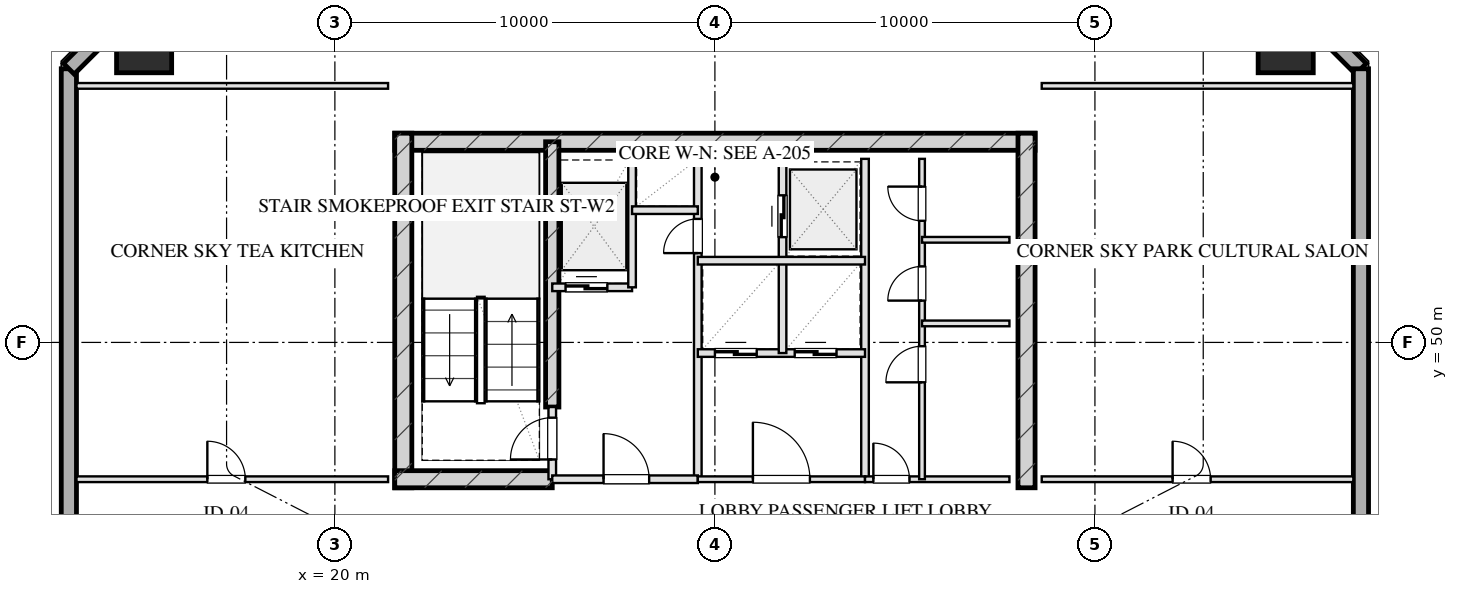
"""IFC4 building model, lengths in metres.
Left out: names, types, materials, properties, quantities, classifications, styles, units other than length and angle.
Written with IfcOpenShell. Run it as: python <this file> out.ifc"""

import sys

from ifc_helpers import new_model, si_unit, direction, frame, frame_2d, origin, origin_2d, place, context, subcontext, project, spatial, rectangle, hollow_rectangle, extrude, element, fill, save


model = new_model("IFC4")
c1 = context("Model", 3, precision=1e-05, world=origin(), true_north=direction((0.0, 1.0)))
c2 = subcontext(c1, "Body", "Model", "MODEL_VIEW")
j1 = project(units=[si_unit("LENGTHUNIT", "METRE"), si_unit("PLANEANGLEUNIT", "RADIAN")], contexts=[c1])
p1 = place(None, origin())
s1 = spatial("IfcSite", under=j1, at=p1, CompositionType="ELEMENT")
p2 = place(p1, origin())
s2 = spatial("IfcBuilding", under=s1, at=p2, CompositionType="ELEMENT")
p3 = place(p2, frame((0.0, 0.0, 216.2)))
s3 = spatial("IfcBuildingStorey", under=s2, at=p3, CompositionType="ELEMENT", Elevation=216.2)
p4 = place(p3, frame((21.575, 55.28, 0.0), z_axis=(0.0, 0.0, 1.0), x_axis=(1.0, 0.0, 0.0)))
e1 = element("IfcWall", 1, at=p4, inside=s3, PredefinedType="SHEAR", context=c2, shape_type="SweptSolid", body=[
    extrude(rectangle(XDim=16.85, YDim=0.45, at=frame_2d((8.425, 0.0))), origin(), (0.0, 0.0, 1.0), 3.45),
])
for number, where, z_axis, x_axis in (
    (2, (21.8, 46.175, 0.0), (0.0, 0.0, 1.0), (0.0, 1.0, 0.0)),
    (3, (38.2, 46.175, 0.0), (0.0, 0.0, 1.0), (0.0, 1.0, 0.0)),
):
    element("IfcWall", number, at=place(p3, frame(where, z_axis=z_axis, x_axis=x_axis)), inside=s3, PredefinedType="SHEAR", context=c2, shape_type="SweptSolid", body=[
        extrude(rectangle(XDim=9.33, YDim=0.45, at=frame_2d((4.665, 0.0))), origin(), (0.0, 0.0, 1.0), 3.45),
    ])
p5 = place(p3, frame((25.72, 48.3, 0.0), z_axis=(0.0, 0.0, 1.0), x_axis=(0.0, 1.0, 0.0)))
e4 = element("IfcWall", 4, at=p5, inside=s3, PredefinedType="SHEAR", context=c2, shape_type="SweptSolid", body=[
    extrude(rectangle(XDim=6.98, YDim=0.35, at=frame_2d((3.49, 0.0))), origin(), (0.0, 0.0, 1.0), 3.45),
])
p6 = place(p3, frame((21.575, 46.4, 0.0), z_axis=(0.0, 0.0, 1.0), x_axis=(1.0, 0.0, 0.0)))
e5 = element("IfcWall", 5, at=p6, inside=s3, PredefinedType="SHEAR", context=c2, shape_type="SweptSolid", body=[
    extrude(rectangle(XDim=4.145, YDim=0.45, at=frame_2d((2.073, 0.0))), origin(), (0.0, 0.0, 1.0), 3.45),
])
for number, where, z_axis, x_axis in (
    (6, (45.02, 57.82, 0.0), (0.0, 0.0, 1.0), (1.0, 0.0, 0.0)),
    (7, (14.98, 57.82, 0.0), (0.0, 0.0, 1.0), (1.0, 0.0, 0.0)),
):
    element("IfcColumn", number, at=place(p3, frame(where, z_axis=z_axis, x_axis=x_axis)), inside=s3, PredefinedType="COLUMN", context=c2, shape_type="SweptSolid", body=[
        extrude(hollow_rectangle(XDim=1.45, YDim=1.45, WallThickness=0.05, at=origin_2d()), origin(), (0.0, 0.0, 1.0), 3.451),
    ])
p7 = place(p3, frame((13.0, 10.8, 0.0), z_axis=(0.0, 0.0, 1.0), x_axis=(0.0, 1.0, 0.0)))
e8 = element("IfcWall", 8, at=p7, inside=s3, PredefinedType="SOLIDWALL", context=c2, shape_type="SweptSolid", body=[
    extrude(rectangle(XDim=46.4, YDim=0.4, at=frame_2d((23.2, 0.0))), origin(), (0.0, 0.0, 1.0), 2.55),
])
p8 = place(p7, frame((15.75, 0.0, 0.75)))
e9 = element("IfcOpeningElement", 9, at=p8, cuts=e8, PredefinedType="OPENING", context=c2, shape_type="SweptSolid", body=[
    extrude(rectangle(XDim=2.1, YDim=1.4, at=frame_2d((1.05, 0.7))), frame((0.0, 0.21, 0.0), z_axis=(0.0, -1.0, 0.0), x_axis=(1.0, 0.0, 0.0)), (0.0, 0.0, 1.0), 0.42),
])
p9 = place(p7, frame((19.55, 0.0, 0.75)))
e10 = element("IfcOpeningElement", 10, at=p9, cuts=e8, PredefinedType="OPENING", context=c2, shape_type="SweptSolid", body=[
    extrude(rectangle(XDim=2.1, YDim=1.4, at=frame_2d((1.05, 0.7))), frame((0.0, 0.21, 0.0), z_axis=(0.0, -1.0, 0.0), x_axis=(1.0, 0.0, 0.0)), (0.0, 0.0, 1.0), 0.42),
])
p10 = place(p7, frame((24.75, 0.0, 0.75)))
e11 = element("IfcOpeningElement", 11, at=p10, cuts=e8, PredefinedType="OPENING", context=c2, shape_type="SweptSolid", body=[
    extrude(rectangle(XDim=2.1, YDim=1.4, at=frame_2d((1.05, 0.7))), frame((0.0, 0.21, 0.0), z_axis=(0.0, -1.0, 0.0), x_axis=(1.0, 0.0, 0.0)), (0.0, 0.0, 1.0), 0.42),
])
p11 = place(p7, frame((28.55, 0.0, 0.75)))
e12 = element("IfcOpeningElement", 12, at=p11, cuts=e8, PredefinedType="OPENING", context=c2, shape_type="SweptSolid", body=[
    extrude(rectangle(XDim=2.1, YDim=1.4, at=frame_2d((1.05, 0.7))), frame((0.0, 0.21, 0.0), z_axis=(0.0, -1.0, 0.0), x_axis=(1.0, 0.0, 0.0)), (0.0, 0.0, 1.0), 0.42),
])
for number, where, z_axis, x_axis in (
    (13, (13.0, 57.2, 0.0), (0.0, 0.0, 1.0), (0.707, 0.707, 0.0)),
    (14, (44.4, 59.8, 0.0), (0.0, 0.0, 1.0), (0.707, -0.707, 0.0)),
):
    element("IfcWall", number, at=place(p3, frame(where, z_axis=z_axis, x_axis=x_axis)), inside=s3, PredefinedType="SOLIDWALL", context=c2, shape_type="SweptSolid", body=[
        extrude(rectangle(XDim=3.677, YDim=0.4, at=frame_2d((1.838, 0.0))), origin(), (0.0, 0.0, 1.0), 2.55),
    ])
p12 = place(p3, frame((47.0, 57.2, 0.0), z_axis=(0.0, 0.0, 1.0), x_axis=(0.0, -1.0, 0.0)))
e15 = element("IfcWall", 15, at=p12, inside=s3, PredefinedType="SOLIDWALL", context=c2, shape_type="SweptSolid", body=[
    extrude(rectangle(XDim=46.4, YDim=0.4, at=frame_2d((23.2, 0.0))), origin(), (0.0, 0.0, 1.0), 2.55),
])
p13 = place(p12, frame((16.4, 0.0, 0.0)))
e16 = element("IfcOpeningElement", 16, at=p13, cuts=e15, PredefinedType="OPENING", context=c2, shape_type="SweptSolid", body=[
    extrude(rectangle(XDim=1.8, YDim=2.2, at=frame_2d((0.9, 1.1))), frame((0.0, 0.21, 0.0), z_axis=(0.0, -1.0, 0.0), x_axis=(1.0, 0.0, 0.0)), (0.0, 0.0, 1.0), 0.42),
])
p14 = place(p3, frame((25.72, 46.4, 0.0), z_axis=(0.0, 0.0, 1.0), x_axis=(0.0, 1.0, 0.0)))
e17 = element("IfcWall", 17, at=p14, inside=s3, PredefinedType="PARTITIONING", context=c2, shape_type="SweptSolid", body=[
    extrude(rectangle(XDim=1.9, YDim=0.2, at=frame_2d((0.95, 0.0))), origin(), (0.0, 0.0, 1.0), 3.155),
])
p15 = place(p14, frame((0.52, 0.0, 0.0)))
e18 = element("IfcOpeningElement", 18, at=p15, cuts=e17, PredefinedType="OPENING", context=c2, shape_type="SweptSolid", body=[
    extrude(rectangle(XDim=1.1, YDim=2.05, at=frame_2d((0.55, 1.025))), frame((0.0, 0.11, 0.0), z_axis=(0.0, -1.0, 0.0), x_axis=(1.0, 0.0, 0.0)), (0.0, 0.0, 1.0), 0.22),
])
p16 = place(p3, frame((29.55, 46.4, 0.0), z_axis=(0.0, 0.0, 1.0), x_axis=(0.0, 1.0, 0.0)))
e19 = element("IfcWall", 19, at=p16, inside=s3, PredefinedType="PARTITIONING", context=c2, shape_type="SweptSolid", body=[
    extrude(rectangle(XDim=8.43, YDim=0.2, at=frame_2d((4.215, 0.0))), origin(), (0.0, 0.0, 1.0), 3.155),
])
p17 = place(p16, frame((5.95, 0.0, 0.0)))
e20 = element("IfcOpeningElement", 20, at=p17, cuts=e19, PredefinedType="OPENING", context=c2, shape_type="SweptSolid", body=[
    extrude(rectangle(XDim=0.9, YDim=2.05, at=frame_2d((0.45, 1.025))), frame((0.0, 0.11, 0.0), z_axis=(0.0, -1.0, 0.0), x_axis=(1.0, 0.0, 0.0)), (0.0, 0.0, 1.0), 0.22),
])
p18 = place(p3, frame((25.72, 46.4, 0.0), z_axis=(0.0, 0.0, 1.0), x_axis=(1.0, 0.0, 0.0)))
e21 = element("IfcWall", 21, at=p18, inside=s3, PredefinedType="PARTITIONING", context=c2, shape_type="SweptSolid", body=[
    extrude(rectangle(XDim=3.83, YDim=0.2, at=frame_2d((1.915, 0.0))), origin(), (0.0, 0.0, 1.0), 3.155),
])
p19 = place(p18, frame((1.35, 0.0, 0.0)))
e22 = element("IfcOpeningElement", 22, at=p19, cuts=e21, PredefinedType="OPENING", context=c2, shape_type="SweptSolid", body=[
    extrude(rectangle(XDim=1.2, YDim=2.05, at=frame_2d((0.6, 1.025))), frame((0.0, 0.11, 0.0), z_axis=(0.0, -1.0, 0.0), x_axis=(1.0, 0.0, 0.0)), (0.0, 0.0, 1.0), 0.22),
])
p20 = place(p3, frame((25.72, 51.45, 0.0), z_axis=(0.0, 0.0, 1.0), x_axis=(1.0, 0.0, 0.0)))
e23 = element("IfcWall", 23, at=p20, inside=s3, PredefinedType="PARTITIONING", context=c2, shape_type="SweptSolid", body=[
    extrude(rectangle(XDim=2.1, YDim=0.2, at=frame_2d((1.05, 0.0))), origin(), (0.0, 0.0, 1.0), 3.155),
])
p21 = place(p20, frame((0.35, 0.0, 0.0)))
e24 = element("IfcOpeningElement", 24, at=p21, cuts=e23, PredefinedType="OPENING", context=c2, shape_type="SweptSolid", body=[
    extrude(rectangle(XDim=1.1, YDim=2.05, at=frame_2d((0.55, 1.025))), frame((0.0, 0.11, 0.0), z_axis=(0.0, -1.0, 0.0), x_axis=(1.0, 0.0, 0.0)), (0.0, 0.0, 1.0), 0.22),
])
p22 = place(p3, frame((27.82, 51.45, 0.0), z_axis=(0.0, 0.0, 1.0), x_axis=(0.0, 1.0, 0.0)))
e25 = element("IfcWall", 25, at=p22, inside=s3, PredefinedType="PARTITIONING", context=c2, shape_type="SweptSolid", body=[
    extrude(rectangle(XDim=3.7, YDim=0.2, at=frame_2d((1.85, 0.0))), origin(), (0.0, 0.0, 1.0), 3.155),
])
p23 = place(p3, frame((27.82, 53.48, 0.0), z_axis=(0.0, 0.0, 1.0), x_axis=(1.0, 0.0, 0.0)))
e26 = element("IfcWall", 26, at=p23, inside=s3, PredefinedType="PARTITIONING", context=c2, shape_type="SweptSolid", body=[
    extrude(rectangle(XDim=1.73, YDim=0.2, at=frame_2d((0.865, 0.0))), origin(), (0.0, 0.0, 1.0), 3.155),
])
p24 = place(p3, frame((33.95, 46.4, 0.0), z_axis=(0.0, 0.0, 1.0), x_axis=(0.0, 1.0, 0.0)))
e27 = element("IfcWall", 27, at=p24, inside=s3, PredefinedType="PARTITIONING", context=c2, shape_type="SweptSolid", body=[
    extrude(rectangle(XDim=8.43, YDim=0.2, at=frame_2d((4.215, 0.0))), origin(), (0.0, 0.0, 1.0), 3.155),
])
p25 = place(p3, frame((29.55, 46.4, 0.0), z_axis=(0.0, 0.0, 1.0), x_axis=(1.0, 0.0, 0.0)))
e28 = element("IfcWall", 28, at=p25, inside=s3, PredefinedType="PARTITIONING", context=c2, shape_type="SweptSolid", body=[
    extrude(rectangle(XDim=4.4, YDim=0.15, at=frame_2d((2.2, 0.0))), origin(), (0.0, 0.0, 1.0), 3.155),
])
p26 = place(p25, frame((1.45, 0.0, 0.0)))
e29 = element("IfcOpeningElement", 29, at=p26, cuts=e28, PredefinedType="OPENING", context=c2, shape_type="SweptSolid", body=[
    extrude(rectangle(XDim=1.5, YDim=2.05, at=frame_2d((0.75, 1.025))), frame((0.0, 0.085, 0.0), z_axis=(0.0, -1.0, 0.0), x_axis=(1.0, 0.0, 0.0)), (0.0, 0.0, 1.0), 0.17),
])
p27 = place(p3, frame((29.55, 49.72, 0.0), z_axis=(0.0, 0.0, 1.0), x_axis=(1.0, 0.0, 0.0)))
e30 = element("IfcWall", 30, at=p27, inside=s3, PredefinedType="PARTITIONING", context=c2, shape_type="SweptSolid", body=[
    extrude(rectangle(XDim=4.4, YDim=0.2, at=frame_2d((2.2, 0.0))), origin(), (0.0, 0.0, 1.0), 3.155),
])
p28 = place(p27, frame((0.45, 0.0, 0.0)))
e31 = element("IfcOpeningElement", 31, at=p28, cuts=e30, PredefinedType="OPENING", context=c2, shape_type="SweptSolid", body=[
    extrude(rectangle(XDim=1.1, YDim=2.05, at=frame_2d((0.55, 1.025))), frame((0.0, 0.11, 0.0), z_axis=(0.0, -1.0, 0.0), x_axis=(1.0, 0.0, 0.0)), (0.0, 0.0, 1.0), 0.22),
])
p29 = place(p27, frame((2.55, 0.0, 0.0)))
e32 = element("IfcOpeningElement", 32, at=p29, cuts=e30, PredefinedType="OPENING", context=c2, shape_type="SweptSolid", body=[
    extrude(rectangle(XDim=1.1, YDim=2.05, at=frame_2d((0.55, 1.025))), frame((0.0, 0.11, 0.0), z_axis=(0.0, -1.0, 0.0), x_axis=(1.0, 0.0, 0.0)), (0.0, 0.0, 1.0), 0.22),
])
p30 = place(p3, frame((31.78, 49.72, 0.0), z_axis=(0.0, 0.0, 1.0), x_axis=(0.0, 1.0, 0.0)))
e33 = element("IfcWall", 33, at=p30, inside=s3, PredefinedType="PARTITIONING", context=c2, shape_type="SweptSolid", body=[
    extrude(rectangle(XDim=5.11, YDim=0.2, at=frame_2d((2.555, 0.0))), origin(), (0.0, 0.0, 1.0), 3.155),
])
p31 = place(p30, frame((3.05, 0.0, 0.0)))
e34 = element("IfcOpeningElement", 34, at=p31, cuts=e33, PredefinedType="OPENING", context=c2, shape_type="SweptSolid", body=[
    extrude(rectangle(XDim=1.1, YDim=2.05, at=frame_2d((0.55, 1.025))), frame((0.0, 0.11, 0.0), z_axis=(0.0, -1.0, 0.0), x_axis=(1.0, 0.0, 0.0)), (0.0, 0.0, 1.0), 0.22),
])
p32 = place(p3, frame((29.55, 52.15, 0.0), z_axis=(0.0, 0.0, 1.0), x_axis=(1.0, 0.0, 0.0)))
e35 = element("IfcWall", 35, at=p32, inside=s3, PredefinedType="PARTITIONING", context=c2, shape_type="SweptSolid", body=[
    extrude(rectangle(XDim=4.4, YDim=0.2, at=frame_2d((2.2, 0.0))), origin(), (0.0, 0.0, 1.0), 3.155),
])
p33 = place(p3, frame((33.95, 46.4, 0.0), z_axis=(0.0, 0.0, 1.0), x_axis=(1.0, 0.0, 0.0)))
e36 = element("IfcWall", 36, at=p33, inside=s3, PredefinedType="PARTITIONING", context=c2, shape_type="SweptSolid", body=[
    extrude(rectangle(XDim=3.8, YDim=0.15, at=frame_2d((1.9, 0.0))), origin(), (0.0, 0.0, 1.0), 3.155),
])
p34 = place(p33, frame((0.22, 0.0, 0.0)))
e37 = element("IfcOpeningElement", 37, at=p34, cuts=e36, PredefinedType="OPENING", context=c2, shape_type="SweptSolid", body=[
    extrude(rectangle(XDim=0.95, YDim=2.05, at=frame_2d((0.475, 1.025))), frame((0.0, 0.085, 0.0), z_axis=(0.0, -1.0, 0.0), x_axis=(1.0, 0.0, 0.0)), (0.0, 0.0, 1.0), 0.17),
])
p35 = place(p3, frame((35.45, 46.4, 0.0), z_axis=(0.0, 0.0, 1.0), x_axis=(0.0, 1.0, 0.0)))
e38 = element("IfcWall", 38, at=p35, inside=s3, PredefinedType="PARTITIONING", context=c2, shape_type="SweptSolid", body=[
    extrude(rectangle(XDim=8.43, YDim=0.15, at=frame_2d((4.215, 0.0))), origin(), (0.0, 0.0, 1.0), 2.745),
])
p36 = place(p35, frame((2.55, 0.0, 0.0)))
e39 = element("IfcOpeningElement", 39, at=p36, cuts=e38, PredefinedType="OPENING", context=c2, shape_type="SweptSolid", body=[
    extrude(rectangle(XDim=0.95, YDim=2.05, at=frame_2d((0.475, 1.025))), frame((0.0, 0.085, 0.0), z_axis=(0.0, -1.0, 0.0), x_axis=(1.0, 0.0, 0.0)), (0.0, 0.0, 1.0), 0.17),
])
p37 = place(p35, frame((4.7, 0.0, 0.0)))
e40 = element("IfcOpeningElement", 40, at=p37, cuts=e38, PredefinedType="OPENING", context=c2, shape_type="SweptSolid", body=[
    extrude(rectangle(XDim=0.9, YDim=2.05, at=frame_2d((0.45, 1.025))), frame((0.0, 0.085, 0.0), z_axis=(0.0, -1.0, 0.0), x_axis=(1.0, 0.0, 0.0)), (0.0, 0.0, 1.0), 0.17),
])
p38 = place(p35, frame((6.8, 0.0, 0.0)))
e41 = element("IfcOpeningElement", 41, at=p38, cuts=e38, PredefinedType="OPENING", context=c2, shape_type="SweptSolid", body=[
    extrude(rectangle(XDim=0.9, YDim=2.05, at=frame_2d((0.45, 1.025))), frame((0.0, 0.085, 0.0), z_axis=(0.0, -1.0, 0.0), x_axis=(1.0, 0.0, 0.0)), (0.0, 0.0, 1.0), 0.17),
])
for number, where, z_axis, x_axis in (
    (42, (35.45, 50.5, 0.0), (0.0, 0.0, 1.0), (1.0, 0.0, 0.0)),
    (43, (35.45, 52.7, 0.0), (0.0, 0.0, 1.0), (1.0, 0.0, 0.0)),
):
    element("IfcWall", number, at=place(p3, frame(where, z_axis=z_axis, x_axis=x_axis)), inside=s3, PredefinedType="PARTITIONING", context=c2, shape_type="SweptSolid", body=[
        extrude(rectangle(XDim=2.3, YDim=0.15, at=frame_2d((1.15, 0.0))), origin(), (0.0, 0.0, 1.0), 3.155),
    ])
p39 = place(p3, frame((13.2, 56.75, 0.0), z_axis=(0.0, 0.0, 1.0), x_axis=(1.0, 0.0, 0.0)))
e44 = element("IfcWall", 44, at=p39, inside=s3, PredefinedType="PARTITIONING", context=c2, shape_type="SweptSolid", body=[
    extrude(rectangle(XDim=8.2, YDim=0.15, at=frame_2d((4.1, 0.0))), origin(), (0.0, 0.0, 1.0), 3.155),
])
p40 = place(p3, frame((13.2, 46.4, 0.0), z_axis=(0.0, 0.0, 1.0), x_axis=(1.0, 0.0, 0.0)))
e45 = element("IfcWall", 45, at=p40, inside=s3, PredefinedType="PARTITIONING", context=c2, shape_type="SweptSolid", body=[
    extrude(rectangle(XDim=8.2, YDim=0.15, at=frame_2d((4.1, 0.0))), origin(), (0.0, 0.0, 1.0), 3.155),
])
p41 = place(p40, frame((3.444, 0.0, 0.0)))
e46 = element("IfcOpeningElement", 46, at=p41, cuts=e45, PredefinedType="OPENING", context=c2, shape_type="SweptSolid", body=[
    extrude(rectangle(XDim=1.0, YDim=2.05, at=frame_2d((0.5, 1.025))), frame((0.0, 0.085, 0.0), z_axis=(0.0, -1.0, 0.0), x_axis=(1.0, 0.0, 0.0)), (0.0, 0.0, 1.0), 0.17),
])
p42 = place(p3, frame((38.6, 56.75, 0.0), z_axis=(0.0, 0.0, 1.0), x_axis=(1.0, 0.0, 0.0)))
e47 = element("IfcWall", 47, at=p42, inside=s3, PredefinedType="PARTITIONING", context=c2, shape_type="SweptSolid", body=[
    extrude(rectangle(XDim=8.2, YDim=0.15, at=frame_2d((4.1, 0.0))), origin(), (0.0, 0.0, 1.0), 3.155),
])
p43 = place(p3, frame((38.6, 46.4, 0.0), z_axis=(0.0, 0.0, 1.0), x_axis=(1.0, 0.0, 0.0)))
e48 = element("IfcWall", 48, at=p43, inside=s3, PredefinedType="PARTITIONING", context=c2, shape_type="SweptSolid", body=[
    extrude(rectangle(XDim=8.2, YDim=0.15, at=frame_2d((4.1, 0.0))), origin(), (0.0, 0.0, 1.0), 3.155),
])
p44 = place(p43, frame((3.444, 0.0, 0.0)))
e49 = element("IfcOpeningElement", 49, at=p44, cuts=e48, PredefinedType="OPENING", context=c2, shape_type="SweptSolid", body=[
    extrude(rectangle(XDim=1.0, YDim=2.05, at=frame_2d((0.5, 1.025))), frame((0.0, 0.085, 0.0), z_axis=(0.0, -1.0, 0.0), x_axis=(1.0, 0.0, 0.0)), (0.0, 0.0, 1.0), 0.17),
])
p45 = place(p15, origin())
e50 = element("IfcDoor", 50, at=p45, inside=s3, OperationType="SINGLE_SWING_LEFT", PredefinedType="DOOR", context=c2, shape_type="SweptSolid", body=[
    extrude(rectangle(XDim=1.1, YDim=2.05, at=frame_2d((0.55, 1.025))), frame((0.0, 0.025, 0.0), z_axis=(0.0, -1.0, 0.0), x_axis=(1.0, 0.0, 0.0)), (0.0, 0.0, 1.0), 0.05),
])
fill(e18, e50)
p46 = place(p17, origin())
e51 = element("IfcDoor", 51, at=p46, inside=s3, OperationType="SINGLE_SWING_LEFT", PredefinedType="DOOR", context=c2, shape_type="SweptSolid", body=[
    extrude(rectangle(XDim=0.9, YDim=2.05, at=frame_2d((0.45, 1.025))), frame((0.0, 0.025, 0.0), z_axis=(0.0, -1.0, 0.0), x_axis=(1.0, 0.0, 0.0)), (0.0, 0.0, 1.0), 0.05),
])
fill(e20, e51)
p47 = place(p19, origin())
e52 = element("IfcDoor", 52, at=p47, inside=s3, OperationType="SINGLE_SWING_LEFT", PredefinedType="DOOR", context=c2, shape_type="SweptSolid", body=[
    extrude(rectangle(XDim=1.2, YDim=2.05, at=frame_2d((0.6, 1.025))), frame((0.0, 0.025, 0.0), z_axis=(0.0, -1.0, 0.0), x_axis=(1.0, 0.0, 0.0)), (0.0, 0.0, 1.0), 0.05),
])
fill(e22, e52)
p48 = place(p21, origin())
e53 = element("IfcDoor", 53, at=p48, inside=s3, OperationType="DOUBLE_DOOR_SLIDING", PredefinedType="DOOR", context=c2, shape_type="SweptSolid", body=[
    extrude(rectangle(XDim=1.1, YDim=2.05, at=frame_2d((0.55, 1.025))), frame((0.0, 0.025, 0.0), z_axis=(0.0, -1.0, 0.0), x_axis=(1.0, 0.0, 0.0)), (0.0, 0.0, 1.0), 0.05),
])
fill(e24, e53)
p49 = place(p26, origin())
e54 = element("IfcDoor", 54, at=p49, inside=s3, OperationType="SINGLE_SWING_LEFT", PredefinedType="DOOR", context=c2, shape_type="SweptSolid", body=[
    extrude(rectangle(XDim=1.5, YDim=2.05, at=frame_2d((0.75, 1.025))), frame((0.0, 0.025, 0.0), z_axis=(0.0, -1.0, 0.0), x_axis=(1.0, 0.0, 0.0)), (0.0, 0.0, 1.0), 0.05),
])
fill(e29, e54)
p50 = place(p28, origin())
e55 = element("IfcDoor", 55, at=p50, inside=s3, OperationType="DOUBLE_DOOR_SLIDING", PredefinedType="DOOR", context=c2, shape_type="SweptSolid", body=[
    extrude(rectangle(XDim=1.1, YDim=2.05, at=frame_2d((0.55, 1.025))), frame((0.0, 0.025, 0.0), z_axis=(0.0, -1.0, 0.0), x_axis=(1.0, 0.0, 0.0)), (0.0, 0.0, 1.0), 0.05),
])
fill(e31, e55)
p51 = place(p29, origin())
e56 = element("IfcDoor", 56, at=p51, inside=s3, OperationType="DOUBLE_DOOR_SLIDING", PredefinedType="DOOR", context=c2, shape_type="SweptSolid", body=[
    extrude(rectangle(XDim=1.1, YDim=2.05, at=frame_2d((0.55, 1.025))), frame((0.0, 0.025, 0.0), z_axis=(0.0, -1.0, 0.0), x_axis=(1.0, 0.0, 0.0)), (0.0, 0.0, 1.0), 0.05),
])
fill(e32, e56)
p52 = place(p31, origin())
e57 = element("IfcDoor", 57, at=p52, inside=s3, OperationType="DOUBLE_DOOR_SLIDING", PredefinedType="DOOR", context=c2, shape_type="SweptSolid", body=[
    extrude(rectangle(XDim=1.1, YDim=2.05, at=frame_2d((0.55, 1.025))), frame((0.0, 0.025, 0.0), z_axis=(0.0, -1.0, 0.0), x_axis=(1.0, 0.0, 0.0)), (0.0, 0.0, 1.0), 0.05),
])
fill(e34, e57)
p53 = place(p34, origin())
e58 = element("IfcDoor", 58, at=p53, inside=s3, OperationType="SINGLE_SWING_LEFT", PredefinedType="DOOR", context=c2, shape_type="SweptSolid", body=[
    extrude(rectangle(XDim=0.95, YDim=2.05, at=frame_2d((0.475, 1.025))), frame((0.0, 0.025, 0.0), z_axis=(0.0, -1.0, 0.0), x_axis=(1.0, 0.0, 0.0)), (0.0, 0.0, 1.0), 0.05),
])
fill(e37, e58)
p54 = place(p36, origin())
e59 = element("IfcDoor", 59, at=p54, inside=s3, OperationType="SINGLE_SWING_LEFT", PredefinedType="DOOR", context=c2, shape_type="SweptSolid", body=[
    extrude(rectangle(XDim=0.95, YDim=2.05, at=frame_2d((0.475, 1.025))), frame((0.0, 0.025, 0.0), z_axis=(0.0, -1.0, 0.0), x_axis=(1.0, 0.0, 0.0)), (0.0, 0.0, 1.0), 0.05),
])
fill(e39, e59)
p55 = place(p37, origin())
e60 = element("IfcDoor", 60, at=p55, inside=s3, OperationType="SINGLE_SWING_LEFT", PredefinedType="DOOR", context=c2, shape_type="SweptSolid", body=[
    extrude(rectangle(XDim=0.9, YDim=2.05, at=frame_2d((0.45, 1.025))), frame((0.0, 0.025, 0.0), z_axis=(0.0, -1.0, 0.0), x_axis=(1.0, 0.0, 0.0)), (0.0, 0.0, 1.0), 0.05),
])
fill(e40, e60)
p56 = place(p38, origin())
e61 = element("IfcDoor", 61, at=p56, inside=s3, OperationType="SINGLE_SWING_RIGHT", PredefinedType="DOOR", context=c2, shape_type="SweptSolid", body=[
    extrude(rectangle(XDim=0.9, YDim=2.05, at=frame_2d((0.45, 1.025))), frame((0.0, 0.025, 0.0), z_axis=(0.0, -1.0, 0.0), x_axis=(1.0, 0.0, 0.0)), (0.0, 0.0, 1.0), 0.05),
])
fill(e41, e61)
p57 = place(p41, origin())
e62 = element("IfcDoor", 62, at=p57, inside=s3, OperationType="SINGLE_SWING_LEFT", PredefinedType="DOOR", context=c2, shape_type="SweptSolid", body=[
    extrude(rectangle(XDim=1.0, YDim=2.05, at=frame_2d((0.5, 1.025))), frame((0.0, 0.025, 0.0), z_axis=(0.0, -1.0, 0.0), x_axis=(1.0, 0.0, 0.0)), (0.0, 0.0, 1.0), 0.05),
])
fill(e46, e62)
p58 = place(p44, origin())
e63 = element("IfcDoor", 63, at=p58, inside=s3, OperationType="SINGLE_SWING_LEFT", PredefinedType="DOOR", context=c2, shape_type="SweptSolid", body=[
    extrude(rectangle(XDim=1.0, YDim=2.05, at=frame_2d((0.5, 1.025))), frame((0.0, 0.025, 0.0), z_axis=(0.0, -1.0, 0.0), x_axis=(1.0, 0.0, 0.0)), (0.0, 0.0, 1.0), 0.05),
])
fill(e49, e63)
save(model, sys.argv[1])
